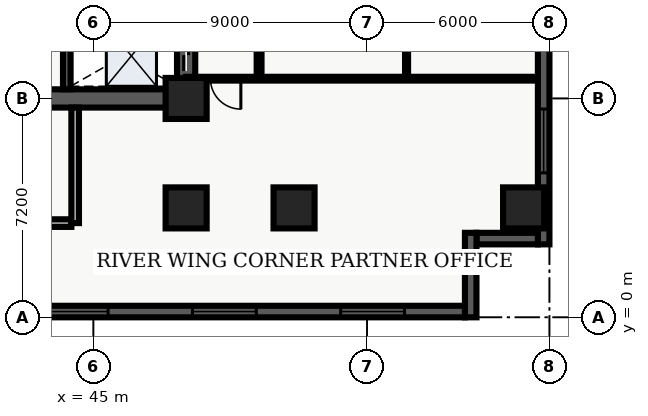
"""IFC4 building model, lengths in metres.
Left out: names, types, materials, properties, quantities, classifications, styles, units other than length and angle.
Written with IfcOpenShell. Run it as: python <this file> out.ifc"""

import sys

from ifc_helpers import new_model, entity, si_unit, converted_unit, direction, frame, origin_with_axes, origin_2d_with_axis, place, context, subcontext, project, spatial, polyline, rectangle, outline, extrude, element, fill, save


model = new_model("IFC4")
c1 = context("Model", 3, precision=1e-05, world=origin_with_axes(), true_north=direction((0.0, 1.0)))
c2 = subcontext(c1, "Body", "Model", "MODEL_VIEW")
j1 = project(units=[si_unit("LENGTHUNIT", "METRE"), converted_unit("PLANEANGLEUNIT", "DEGREE", entity("IfcPlaneAngleMeasure", 0.017), si_unit("PLANEANGLEUNIT", "RADIAN"), dimensions=[0, 0, 0, 0, 0, 0, 0])], contexts=[c1])
p1 = place(None, origin_with_axes())
s1 = spatial("IfcSite", under=j1, at=p1, CompositionType="ELEMENT")
p2 = place(p1, origin_with_axes())
s2 = spatial("IfcBuilding", under=s1, at=p2, CompositionType="ELEMENT")
p3 = place(p2, frame((0.0, 0.0, 63.9), z_axis=(0.0, 0.0, 1.0), x_axis=(1.0, 0.0, 0.0)))
s3 = spatial("IfcBuildingStorey", under=s2, at=p3, CompositionType="ELEMENT", Elevation=63.9)
p4 = place(p3, frame((40.2, 7.2, 0.0), z_axis=(0.0, 0.0, 1.0), x_axis=(1.0, 0.0, 0.0)))
e1 = element("IfcWall", 1, at=p4, inside=s3, PredefinedType="SHEAR", context=c2, shape_type="SweptSolid", body=[
    extrude(outline(polyline([(0.0, -0.3), (7.85, -0.3), (7.85, 0.3), (0.0, 0.3), (0.0, -0.3)])), origin_with_axes(), (0.0, 0.0, 1.0), 3.66),
])
p5 = place(p4, frame((2.175, 0.0, 0.0), z_axis=(0.0, 0.0, 1.0), x_axis=(1.0, 0.0, 0.0)))
e2 = element("IfcOpeningElement", 2, at=p5, cuts=e1, PredefinedType="OPENING", context=c2, shape_type="SweptSolid", body=[
    extrude(rectangle(XDim=1.05, YDim=0.62, at=origin_2d_with_axis()), origin_with_axes(), (0.0, 0.0, 1.0), 2.15),
])
p6 = place(p3, frame((48.05, 7.2, 0.0), z_axis=(0.0, 0.0, 1.0), x_axis=(0.0, 1.0, 0.0)))
e3 = element("IfcWall", 3, at=p6, inside=s3, PredefinedType="SHEAR", context=c2, shape_type="SweptSolid", body=[
    extrude(outline(polyline([(0.0, -0.3), (15.6, -0.3), (15.6, 0.3), (0.0, 0.3), (0.0, -0.3)])), origin_with_axes(), (0.0, 0.0, 1.0), 3.66),
])
p7 = place(p6, frame((1.425, 0.0, 0.0), z_axis=(0.0, 0.0, 1.0), x_axis=(1.0, 0.0, 0.0)))
e4 = element("IfcOpeningElement", 4, at=p7, cuts=e3, PredefinedType="OPENING", context=c2, shape_type="SweptSolid", body=[
    extrude(rectangle(XDim=1.05, YDim=0.62, at=origin_2d_with_axis()), origin_with_axes(), (0.0, 0.0, 1.0), 2.15),
])
p8 = place(p6, frame((3.475, 0.0, 0.0), z_axis=(0.0, 0.0, 1.0), x_axis=(1.0, 0.0, 0.0)))
e5 = element("IfcOpeningElement", 5, at=p8, cuts=e3, PredefinedType="OPENING", context=c2, shape_type="SweptSolid", body=[
    extrude(rectangle(XDim=1.05, YDim=0.62, at=origin_2d_with_axis()), origin_with_axes(), (0.0, 0.0, 1.0), 2.15),
])
p9 = place(p6, frame((5.625, 0.0, 0.0), z_axis=(0.0, 0.0, 1.0), x_axis=(1.0, 0.0, 0.0)))
e6 = element("IfcOpeningElement", 6, at=p9, cuts=e3, PredefinedType="OPENING", context=c2, shape_type="SweptSolid", body=[
    extrude(rectangle(XDim=0.95, YDim=0.62, at=origin_2d_with_axis()), origin_with_axes(), (0.0, 0.0, 1.0), 2.15),
])
p10 = place(p3, frame((44.125, 7.5, 0.0), z_axis=(0.0, 0.0, 1.0), x_axis=(0.0, 1.0, 0.0)))
e7 = element("IfcWall", 7, at=p10, inside=s3, PredefinedType="SHEAR", context=c2, shape_type="SweptSolid", body=[
    extrude(outline(polyline([(0.0, -0.125), (15.0, -0.125), (15.0, 0.125), (0.0, 0.125), (0.0, -0.125)])), origin_with_axes(), (0.0, 0.0, 1.0), 3.66),
])
p11 = place(p3, frame((40.325, 3.1, 0.0), z_axis=(0.0, 0.0, 1.0), x_axis=(1.0, 0.0, 0.0)))
e8 = element("IfcWall", 8, at=p11, inside=s3, PredefinedType="SOLIDWALL", context=c2, shape_type="SweptSolid", body=[
    extrude(outline(polyline([(0.0, -0.125), (3.95, -0.125), (3.95, 0.125), (0.0, 0.125), (0.0, -0.125)])), origin_with_axes(), (0.0, 0.0, 1.0), 2.7),
])
p12 = place(p3, frame((44.4, 3.1, 0.0), z_axis=(0.0, 0.0, 1.0), x_axis=(0.0, 1.0, 0.0)))
e9 = element("IfcWall", 9, at=p12, inside=s3, PredefinedType="SOLIDWALL", context=c2, shape_type="SweptSolid", body=[
    extrude(outline(polyline([(0.0, -0.125), (3.8, -0.125), (3.8, 0.125), (0.0, 0.125), (0.0, -0.125)])), origin_with_axes(), (0.0, 0.0, 1.0), 2.7),
])
for number, where, z_axis, x_axis in (
    (10, (48.05, 3.6, 0.0), (0.0, 0.0, 1.0), (1.0, 0.0, 0.0)),
    (11, (48.05, 7.2, 0.0), (0.0, 0.0, 1.0), (1.0, 0.0, 0.0)),
    (12, (51.6, 3.6, 0.0), (0.0, 0.0, 1.0), (1.0, 0.0, 0.0)),
    (13, (59.15, 3.6, 0.0), (0.0, 0.0, 1.0), (1.0, 0.0, 0.0)),
):
    element("IfcColumn", number, at=place(p3, frame(where, z_axis=z_axis, x_axis=x_axis)), inside=s3, PredefinedType="COLUMN", context=c2, shape_type="SweptSolid", body=[
        extrude(rectangle(XDim=1.35, YDim=1.35, at=origin_2d_with_axis()), origin_with_axes(), (0.0, 0.0, 1.0), 3.9),
    ])
p13 = place(p3, frame((50.45, 7.85, 0.0), z_axis=(0.0, 0.0, 1.0), x_axis=(0.0, 1.0, 0.0)))
e14 = element("IfcWall", 14, at=p13, inside=s3, PredefinedType="PARTITIONING", context=c2, shape_type="SweptSolid", body=[
    extrude(outline(polyline([(0.0, -0.08), (18.8, -0.08), (18.8, 0.08), (0.0, 0.08), (0.0, -0.08)])), origin_with_axes(), (0.0, 0.0, 1.0), 2.7),
])
p14 = place(p13, frame((6.549, 0.0, 0.0), z_axis=(0.0, 0.0, 1.0), x_axis=(1.0, 0.0, 0.0)))
e15 = element("IfcOpeningElement", 15, at=p14, cuts=e14, PredefinedType="OPENING", context=c2, shape_type="SweptSolid", body=[
    extrude(rectangle(XDim=1.0, YDim=0.18, at=origin_2d_with_axis()), origin_with_axes(), (0.0, 0.0, 1.0), 2.15),
])
p15 = place(p13, frame((18.039, 0.0, 0.0), z_axis=(0.0, 0.0, 1.0), x_axis=(1.0, 0.0, 0.0)))
e16 = element("IfcOpeningElement", 16, at=p15, cuts=e14, PredefinedType="OPENING", context=c2, shape_type="SweptSolid", body=[
    extrude(rectangle(XDim=1.0, YDim=0.18, at=origin_2d_with_axis()), origin_with_axes(), (0.0, 0.0, 1.0), 2.15),
])
p16 = place(p3, frame((59.64, 7.85, 0.0), z_axis=(0.0, 0.0, 1.0), x_axis=(-1.0, 0.0, 0.0)))
e17 = element("IfcWall", 17, at=p16, inside=s3, PredefinedType="PARTITIONING", context=c2, shape_type="SweptSolid", body=[
    extrude(outline(polyline([(0.0, -0.062), (11.59, -0.062), (11.59, 0.062), (0.0, 0.062), (0.0, -0.062)])), origin_with_axes(), (0.0, 0.0, 1.0), 2.7),
])
p17 = place(p16, frame((10.29, 0.0, 0.0), z_axis=(0.0, 0.0, 1.0), x_axis=(1.0, 0.0, 0.0)))
e18 = element("IfcOpeningElement", 18, at=p17, cuts=e17, PredefinedType="OPENING", context=c2, shape_type="SweptSolid", body=[
    extrude(rectangle(XDim=1.0, YDim=0.145, at=origin_2d_with_axis()), origin_with_axes(), (0.0, 0.0, 1.0), 2.15),
])
p18 = place(p3, frame((55.3, 7.98, 0.0), z_axis=(0.0, 0.0, 1.0), x_axis=(0.0, 1.0, 0.0)))
e19 = element("IfcWall", 19, at=p18, inside=s3, PredefinedType="PARTITIONING", context=c2, shape_type="SweptSolid", body=[
    extrude(outline(polyline([(0.0, -0.05), (18.54, -0.05), (18.54, 0.05), (0.0, 0.05), (0.0, -0.05)])), origin_with_axes(), (0.0, 0.0, 1.0), 2.7),
])
p19 = place(p18, frame((6.419, 0.0, 0.0), z_axis=(0.0, 0.0, 1.0), x_axis=(1.0, 0.0, 0.0)))
e20 = element("IfcOpeningElement", 20, at=p19, cuts=e19, PredefinedType="OPENING", context=c2, shape_type="SweptSolid", body=[
    extrude(rectangle(XDim=0.95, YDim=0.12, at=origin_2d_with_axis()), origin_with_axes(), (0.0, 0.0, 1.0), 2.15),
])
p20 = place(p18, frame((15.759, 0.0, 0.0), z_axis=(0.0, 0.0, 1.0), x_axis=(1.0, 0.0, 0.0)))
e21 = element("IfcOpeningElement", 21, at=p20, cuts=e19, PredefinedType="OPENING", context=c2, shape_type="SweptSolid", body=[
    extrude(rectangle(XDim=0.95, YDim=0.12, at=origin_2d_with_axis()), origin_with_axes(), (0.0, 0.0, 1.0), 2.15),
])
p21 = place(p3, frame((59.81, 26.02, 0.0), z_axis=(0.0, 0.0, 1.0), x_axis=(0.0, -1.0, 0.0)))
e22 = element("IfcWall", 22, at=p21, inside=s3, PredefinedType="SOLIDWALL", context=c2, shape_type="SweptSolid", body=[
    extrude(outline(polyline([(0.0, -0.19), (23.62, -0.19), (23.62, 0.19), (0.0, 0.19), (0.0, -0.19)])), origin_with_axes(), (0.0, 0.0, 1.0), 3.66),
])
p22 = place(p21, frame((20.218, 0.0, 0.45), z_axis=(0.0, 0.0, 1.0), x_axis=(1.0, 0.0, 0.0)))
e23 = element("IfcOpeningElement", 23, at=p22, cuts=e22, PredefinedType="OPENING", context=c2, shape_type="SweptSolid", body=[
    extrude(rectangle(XDim=2.1, YDim=0.4, at=origin_2d_with_axis()), origin_with_axes(), (0.0, 0.0, 1.0), 2.2),
])
p23 = place(p3, frame((59.62, 2.59, 0.0), z_axis=(0.0, 0.0, 1.0), x_axis=(-1.0, 0.0, 0.0)))
e24 = element("IfcWall", 24, at=p23, inside=s3, PredefinedType="SOLIDWALL", context=c2, shape_type="SweptSolid", body=[
    extrude(outline(polyline([(0.0, -0.19), (2.02, -0.19), (2.02, 0.19), (0.0, 0.19), (0.0, -0.19)])), origin_with_axes(), (0.0, 0.0, 1.0), 3.66),
])
p24 = place(p3, frame((57.41, 2.78, 0.0), z_axis=(0.0, 0.0, 1.0), x_axis=(0.0, -1.0, 0.0)))
e25 = element("IfcWall", 25, at=p24, inside=s3, PredefinedType="SOLIDWALL", context=c2, shape_type="SweptSolid", body=[
    extrude(outline(polyline([(0.0, -0.19), (2.78, -0.19), (2.78, 0.19), (0.0, 0.19), (0.0, -0.19)])), origin_with_axes(), (0.0, 0.0, 1.0), 3.66),
])
p25 = place(p3, frame((57.22, 0.19, 0.0), z_axis=(0.0, 0.0, 1.0), x_axis=(-1.0, 0.0, 0.0)))
e26 = element("IfcWall", 26, at=p25, inside=s3, PredefinedType="SOLIDWALL", context=c2, shape_type="SweptSolid", body=[
    extrude(outline(polyline([(0.0, -0.19), (54.82, -0.19), (54.82, 0.19), (0.0, 0.19), (0.0, -0.19)])), origin_with_axes(), (0.0, 0.0, 1.0), 3.66),
])
p26 = place(p25, frame((3.037, 0.0, 0.45), z_axis=(0.0, 0.0, 1.0), x_axis=(1.0, 0.0, 0.0)))
e27 = element("IfcOpeningElement", 27, at=p26, cuts=e26, PredefinedType="OPENING", context=c2, shape_type="SweptSolid", body=[
    extrude(rectangle(XDim=2.1, YDim=0.4, at=origin_2d_with_axis()), origin_with_axes(), (0.0, 0.0, 1.0), 2.2),
])
p27 = place(p25, frame((7.912, 0.0, 0.45), z_axis=(0.0, 0.0, 1.0), x_axis=(1.0, 0.0, 0.0)))
e28 = element("IfcOpeningElement", 28, at=p27, cuts=e26, PredefinedType="OPENING", context=c2, shape_type="SweptSolid", body=[
    extrude(rectangle(XDim=2.1, YDim=0.4, at=origin_2d_with_axis()), origin_with_axes(), (0.0, 0.0, 1.0), 2.2),
])
p28 = place(p25, frame((12.786, 0.0, 0.45), z_axis=(0.0, 0.0, 1.0), x_axis=(1.0, 0.0, 0.0)))
e29 = element("IfcOpeningElement", 29, at=p28, cuts=e26, PredefinedType="OPENING", context=c2, shape_type="SweptSolid", body=[
    extrude(rectangle(XDim=2.1, YDim=0.4, at=origin_2d_with_axis()), origin_with_axes(), (0.0, 0.0, 1.0), 2.2),
])
p29 = place(p25, frame((17.661, 0.0, 0.45), z_axis=(0.0, 0.0, 1.0), x_axis=(1.0, 0.0, 0.0)))
e30 = element("IfcOpeningElement", 30, at=p29, cuts=e26, PredefinedType="OPENING", context=c2, shape_type="SweptSolid", body=[
    extrude(rectangle(XDim=2.1, YDim=0.4, at=origin_2d_with_axis()), origin_with_axes(), (0.0, 0.0, 1.0), 2.2),
])
p30 = place(p25, frame((22.535, 0.0, 0.45), z_axis=(0.0, 0.0, 1.0), x_axis=(1.0, 0.0, 0.0)))
e31 = element("IfcOpeningElement", 31, at=p30, cuts=e26, PredefinedType="OPENING", context=c2, shape_type="SweptSolid", body=[
    extrude(rectangle(XDim=2.1, YDim=0.4, at=origin_2d_with_axis()), origin_with_axes(), (0.0, 0.0, 1.0), 2.2),
])
p31 = place(p25, frame((27.41, 0.0, 0.45), z_axis=(0.0, 0.0, 1.0), x_axis=(1.0, 0.0, 0.0)))
e32 = element("IfcOpeningElement", 32, at=p31, cuts=e26, PredefinedType="OPENING", context=c2, shape_type="SweptSolid", body=[
    extrude(rectangle(XDim=2.1, YDim=0.4, at=origin_2d_with_axis()), origin_with_axes(), (0.0, 0.0, 1.0), 2.2),
])
p32 = place(p25, frame((32.285, 0.0, 0.45), z_axis=(0.0, 0.0, 1.0), x_axis=(1.0, 0.0, 0.0)))
e33 = element("IfcOpeningElement", 33, at=p32, cuts=e26, PredefinedType="OPENING", context=c2, shape_type="SweptSolid", body=[
    extrude(rectangle(XDim=2.1, YDim=0.4, at=origin_2d_with_axis()), origin_with_axes(), (0.0, 0.0, 1.0), 2.2),
])
p33 = place(p25, frame((37.159, 0.0, 0.45), z_axis=(0.0, 0.0, 1.0), x_axis=(1.0, 0.0, 0.0)))
e34 = element("IfcOpeningElement", 34, at=p33, cuts=e26, PredefinedType="OPENING", context=c2, shape_type="SweptSolid", body=[
    extrude(rectangle(XDim=2.1, YDim=0.4, at=origin_2d_with_axis()), origin_with_axes(), (0.0, 0.0, 1.0), 2.2),
])
p34 = place(p25, frame((47.758, 0.0, 0.45), z_axis=(0.0, 0.0, 1.0), x_axis=(1.0, 0.0, 0.0)))
e35 = element("IfcOpeningElement", 35, at=p34, cuts=e26, PredefinedType="OPENING", context=c2, shape_type="SweptSolid", body=[
    extrude(rectangle(XDim=2.1, YDim=0.4, at=origin_2d_with_axis()), origin_with_axes(), (0.0, 0.0, 1.0), 2.2),
])
p35 = place(p25, frame((52.633, 0.0, 0.45), z_axis=(0.0, 0.0, 1.0), x_axis=(1.0, 0.0, 0.0)))
e36 = element("IfcOpeningElement", 36, at=p35, cuts=e26, PredefinedType="OPENING", context=c2, shape_type="SweptSolid", body=[
    extrude(rectangle(XDim=2.1, YDim=0.4, at=origin_2d_with_axis()), origin_with_axes(), (0.0, 0.0, 1.0), 2.2),
])
p36 = place(p6, frame((1.425, 0.0, 0.0), z_axis=(0.0, 0.0, 1.0), x_axis=(1.0, 0.0, 0.0)))
e37 = element("IfcDoor", 37, at=p36, inside=s3, OperationType="SLIDING_TO_LEFT", PredefinedType="DOOR", context=c2, shape_type="SweptSolid", body=[
    extrude(rectangle(XDim=1.05, YDim=0.09, at=origin_2d_with_axis()), origin_with_axes(), (0.0, 0.0, 1.0), 2.15),
])
fill(e4, e37)
p37 = place(p16, frame((10.29, 0.0, 0.0), z_axis=(0.0, 0.0, 1.0), x_axis=(1.0, 0.0, 0.0)))
e38 = element("IfcDoor", 38, at=p37, inside=s3, OperationType="SINGLE_SWING_LEFT", PredefinedType="DOOR", context=c2, shape_type="SweptSolid", body=[
    extrude(rectangle(XDim=1.0, YDim=0.075, at=origin_2d_with_axis()), origin_with_axes(), (0.0, 0.0, 1.0), 2.15),
])
fill(e18, e38)
p38 = place(p21, frame((20.218, 0.0, 0.45), z_axis=(0.0, 0.0, 1.0), x_axis=(1.0, 0.0, 0.0)))
e39 = element("IfcWindow", 39, at=p38, inside=s3, PredefinedType="WINDOW", context=c2, shape_type="SweptSolid", body=[
    extrude(rectangle(XDim=2.1, YDim=0.09, at=origin_2d_with_axis()), origin_with_axes(), (0.0, 0.0, 1.0), 2.2),
])
fill(e23, e39)
p39 = place(p25, frame((3.037, 0.0, 0.45), z_axis=(0.0, 0.0, 1.0), x_axis=(1.0, 0.0, 0.0)))
e40 = element("IfcWindow", 40, at=p39, inside=s3, PredefinedType="WINDOW", context=c2, shape_type="SweptSolid", body=[
    extrude(rectangle(XDim=2.1, YDim=0.09, at=origin_2d_with_axis()), origin_with_axes(), (0.0, 0.0, 1.0), 2.2),
])
fill(e27, e40)
p40 = place(p25, frame((7.912, 0.0, 0.45), z_axis=(0.0, 0.0, 1.0), x_axis=(1.0, 0.0, 0.0)))
e41 = element("IfcWindow", 41, at=p40, inside=s3, PredefinedType="WINDOW", context=c2, shape_type="SweptSolid", body=[
    extrude(rectangle(XDim=2.1, YDim=0.09, at=origin_2d_with_axis()), origin_with_axes(), (0.0, 0.0, 1.0), 2.2),
])
fill(e28, e41)
p41 = place(p25, frame((12.786, 0.0, 0.45), z_axis=(0.0, 0.0, 1.0), x_axis=(1.0, 0.0, 0.0)))
e42 = element("IfcWindow", 42, at=p41, inside=s3, PredefinedType="WINDOW", context=c2, shape_type="SweptSolid", body=[
    extrude(rectangle(XDim=2.1, YDim=0.09, at=origin_2d_with_axis()), origin_with_axes(), (0.0, 0.0, 1.0), 2.2),
])
fill(e29, e42)
save(model, sys.argv[1])
